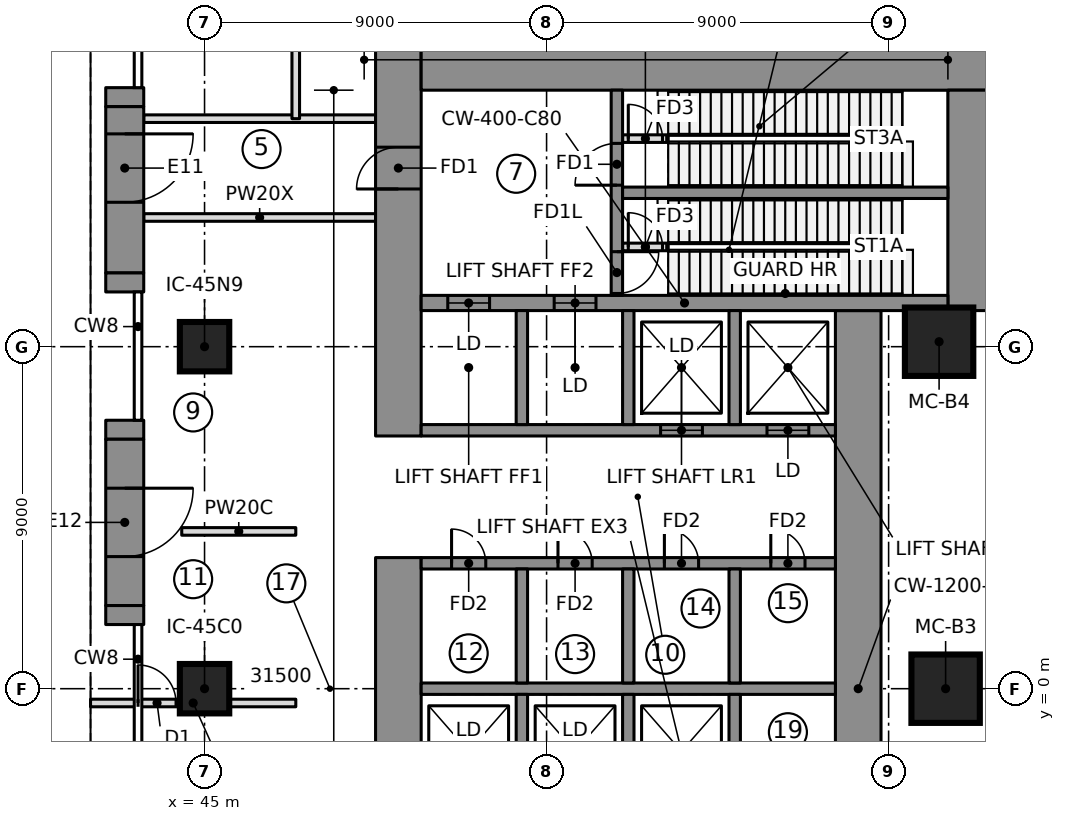
"""IFC4 building model, lengths in metres.
Left out: names, types, materials, properties, quantities, classifications, styles, units other than length and angle.
Written with IfcOpenShell. Run it as: python <this file> out.ifc"""

import sys

from ifc_helpers import new_model, si_unit, direction, frame, frame_2d, origin, origin_2d, place, context, subcontext, project, spatial, polyline, rectangle, outline, extrude, element, fill, save


model = new_model("IFC4")
c1 = context("Model", 3, precision=1e-05, world=origin(), true_north=direction((0.0, 1.0)))
c2 = subcontext(c1, "Body", "Model", "MODEL_VIEW")
j1 = project(units=[si_unit("LENGTHUNIT", "METRE"), si_unit("PLANEANGLEUNIT", "RADIAN")], contexts=[c1])
p1 = place(None, origin())
s1 = spatial("IfcSite", under=j1, at=p1, CompositionType="ELEMENT")
p2 = place(p1, origin())
s2 = spatial("IfcBuilding", under=s1, at=p2, CompositionType="ELEMENT")
p3 = place(p2, origin())
s3 = spatial("IfcBuildingStorey", under=s2, at=p3, CompositionType="ELEMENT", Elevation=0.0)
p4 = place(p3, frame((50.1, 6.65, 0.0), z_axis=(0.0, 0.0, 1.0), x_axis=(0.0, 1.0, 0.0)))
e1 = element("IfcWall", 1, at=p4, inside=s3, PredefinedType="SHEAR", context=c2, shape_type="SweptSolid", body=[
    extrude(rectangle(XDim=10.3, YDim=1.2, at=frame_2d((5.15, 0.0))), origin(), (0.0, 0.0, 1.0), 8.0),
])
p5 = place(p4, frame((6.5, 0.0, 0.0)))
e2 = element("IfcOpeningElement", 2, at=p5, cuts=e1, PredefinedType="OPENING", context=c2, shape_type="SweptSolid", body=[
    extrude(rectangle(XDim=1.1, YDim=2.1, at=frame_2d((0.55, 1.05))), frame((0.0, 0.61, 0.0), z_axis=(0.0, -1.0, 0.0), x_axis=(1.0, 0.0, 0.0)), (0.0, 0.0, 1.0), 1.22),
])
p6 = place(p3, frame((50.1, -3.45, 0.0), z_axis=(0.0, 0.0, 1.0), x_axis=(0.0, 1.0, 0.0)))
e3 = element("IfcWall", 3, at=p6, inside=s3, PredefinedType="SHEAR", context=c2, shape_type="SweptSolid", body=[
    extrude(rectangle(XDim=6.9, YDim=1.2, at=frame_2d((3.45, 0.0))), origin(), (0.0, 0.0, 1.0), 8.0),
])
p7 = place(p3, frame((50.7, 16.35, 0.0), z_axis=(0.0, 0.0, 1.0), x_axis=(1.0, 0.0, 0.0)))
e4 = element("IfcWall", 4, at=p7, inside=s3, PredefinedType="SHEAR", context=c2, shape_type="SweptSolid", body=[
    extrude(rectangle(XDim=15.06, YDim=1.2, at=frame_2d((7.53, 0.0))), origin(), (0.0, 0.0, 1.0), 8.0),
])
p8 = place(p3, frame((65.16, 9.95, 0.0), z_axis=(0.0, 0.0, 1.0), x_axis=(0.0, 1.0, 0.0)))
e5 = element("IfcWall", 5, at=p8, inside=s3, PredefinedType="SHEAR", context=c2, shape_type="SweptSolid", body=[
    extrude(rectangle(XDim=5.8, YDim=1.2, at=frame_2d((2.9, 0.0))), origin(), (0.0, 0.0, 1.0), 8.0),
])
p9 = place(p3, frame((62.2, -9.95, 0.0), z_axis=(0.0, 0.0, 1.0), x_axis=(0.0, 1.0, 0.0)))
e6 = element("IfcWall", 6, at=p9, inside=s3, PredefinedType="SHEAR", context=c2, shape_type="SweptSolid", body=[
    extrude(rectangle(XDim=19.9, YDim=1.2, at=frame_2d((9.95, 0.0))), origin(), (0.0, 0.0, 1.0), 8.0),
])
p10 = place(p3, frame((50.7, 10.15, 0.0), z_axis=(0.0, 0.0, 1.0), x_axis=(1.0, 0.0, 0.0)))
e7 = element("IfcWall", 7, at=p10, inside=s3, PredefinedType="SHEAR", context=c2, shape_type="SweptSolid", body=[
    extrude(rectangle(XDim=13.86, YDim=0.4, at=frame_2d((6.93, 0.0))), origin(), (0.0, 0.0, 1.0), 8.0),
])
p11 = place(p10, frame((0.7, 0.0, 0.0)))
e8 = element("IfcOpeningElement", 8, at=p11, cuts=e7, PredefinedType="OPENING", context=c2, shape_type="SweptSolid", body=[
    extrude(rectangle(XDim=1.1, YDim=2.1, at=frame_2d((0.55, 1.05))), frame((0.0, 0.21, 0.0), z_axis=(0.0, -1.0, 0.0), x_axis=(1.0, 0.0, 0.0)), (0.0, 0.0, 1.0), 0.42),
])
p12 = place(p10, frame((3.5, 0.0, 0.0)))
e9 = element("IfcOpeningElement", 9, at=p12, cuts=e7, PredefinedType="OPENING", context=c2, shape_type="SweptSolid", body=[
    extrude(rectangle(XDim=1.1, YDim=2.1, at=frame_2d((0.55, 1.05))), frame((0.0, 0.21, 0.0), z_axis=(0.0, -1.0, 0.0), x_axis=(1.0, 0.0, 0.0)), (0.0, 0.0, 1.0), 0.42),
])
p13 = place(p3, frame((50.7, 0.0, 0.0), z_axis=(0.0, 0.0, 1.0), x_axis=(1.0, 0.0, 0.0)))
e10 = element("IfcWall", 10, at=p13, inside=s3, PredefinedType="SHEAR", context=c2, shape_type="SweptSolid", body=[
    extrude(rectangle(XDim=10.9, YDim=0.3, at=frame_2d((5.45, 0.0))), origin(), (0.0, 0.0, 1.0), 8.0),
])
p14 = place(p3, frame((50.7, 3.3, 0.0), z_axis=(0.0, 0.0, 1.0), x_axis=(1.0, 0.0, 0.0)))
e11 = element("IfcWall", 11, at=p14, inside=s3, PredefinedType="SHEAR", context=c2, shape_type="SweptSolid", body=[
    extrude(rectangle(XDim=10.9, YDim=0.3, at=frame_2d((5.45, 0.0))), origin(), (0.0, 0.0, 1.0), 8.0),
])
p15 = place(p14, frame((0.8, 0.0, 0.0)))
e12 = element("IfcOpeningElement", 12, at=p15, cuts=e11, PredefinedType="OPENING", context=c2, shape_type="SweptSolid", body=[
    extrude(rectangle(XDim=0.9, YDim=2.1, at=frame_2d((0.45, 1.05))), frame((0.0, 0.16, 0.0), z_axis=(0.0, -1.0, 0.0), x_axis=(1.0, 0.0, 0.0)), (0.0, 0.0, 1.0), 0.32),
])
p16 = place(p14, frame((3.6, 0.0, 0.0)))
e13 = element("IfcOpeningElement", 13, at=p16, cuts=e11, PredefinedType="OPENING", context=c2, shape_type="SweptSolid", body=[
    extrude(rectangle(XDim=0.9, YDim=2.1, at=frame_2d((0.45, 1.05))), frame((0.0, 0.16, 0.0), z_axis=(0.0, -1.0, 0.0), x_axis=(1.0, 0.0, 0.0)), (0.0, 0.0, 1.0), 0.32),
])
p17 = place(p14, frame((6.4, 0.0, 0.0)))
e14 = element("IfcOpeningElement", 14, at=p17, cuts=e11, PredefinedType="OPENING", context=c2, shape_type="SweptSolid", body=[
    extrude(rectangle(XDim=0.9, YDim=2.1, at=frame_2d((0.45, 1.05))), frame((0.0, 0.16, 0.0), z_axis=(0.0, -1.0, 0.0), x_axis=(1.0, 0.0, 0.0)), (0.0, 0.0, 1.0), 0.32),
])
p18 = place(p14, frame((9.2, 0.0, 0.0)))
e15 = element("IfcOpeningElement", 15, at=p18, cuts=e11, PredefinedType="OPENING", context=c2, shape_type="SweptSolid", body=[
    extrude(rectangle(XDim=0.9, YDim=2.1, at=frame_2d((0.45, 1.05))), frame((0.0, 0.16, 0.0), z_axis=(0.0, -1.0, 0.0), x_axis=(1.0, 0.0, 0.0)), (0.0, 0.0, 1.0), 0.32),
])
p19 = place(p3, frame((50.7, 6.8, 0.0), z_axis=(0.0, 0.0, 1.0), x_axis=(1.0, 0.0, 0.0)))
e16 = element("IfcWall", 16, at=p19, inside=s3, PredefinedType="SHEAR", context=c2, shape_type="SweptSolid", body=[
    extrude(rectangle(XDim=10.9, YDim=0.3, at=frame_2d((5.45, 0.0))), origin(), (0.0, 0.0, 1.0), 8.0),
])
p20 = place(p19, frame((6.3, 0.0, 0.0)))
e17 = element("IfcOpeningElement", 17, at=p20, cuts=e16, PredefinedType="OPENING", context=c2, shape_type="SweptSolid", body=[
    extrude(rectangle(XDim=1.1, YDim=2.1, at=frame_2d((0.55, 1.05))), frame((0.0, 0.16, 0.0), z_axis=(0.0, -1.0, 0.0), x_axis=(1.0, 0.0, 0.0)), (0.0, 0.0, 1.0), 0.32),
])
p21 = place(p19, frame((9.1, 0.0, 0.0)))
e18 = element("IfcOpeningElement", 18, at=p21, cuts=e16, PredefinedType="OPENING", context=c2, shape_type="SweptSolid", body=[
    extrude(rectangle(XDim=1.1, YDim=2.1, at=frame_2d((0.55, 1.05))), frame((0.0, 0.16, 0.0), z_axis=(0.0, -1.0, 0.0), x_axis=(1.0, 0.0, 0.0)), (0.0, 0.0, 1.0), 0.32),
])
for number, where, z_axis, x_axis in (
    (19, (53.35, 0.15, 0.0), (0.0, 0.0, 1.0), (0.0, 1.0, 0.0)),
    (20, (53.35, 6.95, 0.0), (0.0, 0.0, 1.0), (0.0, 1.0, 0.0)),
    (21, (56.15, 0.15, 0.0), (0.0, 0.0, 1.0), (0.0, 1.0, 0.0)),
    (22, (56.15, 6.95, 0.0), (0.0, 0.0, 1.0), (0.0, 1.0, 0.0)),
    (23, (58.95, 0.15, 0.0), (0.0, 0.0, 1.0), (0.0, 1.0, 0.0)),
    (24, (58.95, 6.95, 0.0), (0.0, 0.0, 1.0), (0.0, 1.0, 0.0)),
    (25, (53.35, -3.15, 0.0), (0.0, 0.0, 1.0), (0.0, 1.0, 0.0)),
    (26, (56.15, -3.15, 0.0), (0.0, 0.0, 1.0), (0.0, 1.0, 0.0)),
    (27, (58.95, -3.15, 0.0), (0.0, 0.0, 1.0), (0.0, 1.0, 0.0)),
):
    element("IfcWall", number, at=place(p3, frame(where, z_axis=z_axis, x_axis=x_axis)), inside=s3, PredefinedType="SHEAR", context=c2, shape_type="SweptSolid", body=[
        extrude(rectangle(XDim=3.0, YDim=0.3, at=frame_2d((1.5, 0.0))), origin(), (0.0, 0.0, 1.0), 8.0),
    ])
p22 = place(p3, frame((55.85, 10.35, 0.0), z_axis=(0.0, 0.0, 1.0), x_axis=(0.0, 1.0, 0.0)))
e28 = element("IfcWall", 28, at=p22, inside=s3, PredefinedType="SHEAR", context=c2, shape_type="SweptSolid", body=[
    extrude(rectangle(XDim=5.4, YDim=0.3, at=frame_2d((2.7, 0.0))), origin(), (0.0, 0.0, 1.0), 8.0),
])
p23 = place(p22, frame((0.05, 0.0, 0.0)))
e29 = element("IfcOpeningElement", 29, at=p23, cuts=e28, PredefinedType="OPENING", context=c2, shape_type="SweptSolid", body=[
    extrude(rectangle(XDim=1.1, YDim=2.1, at=frame_2d((0.55, 1.05))), frame((0.0, 0.16, 0.0), z_axis=(0.0, -1.0, 0.0), x_axis=(1.0, 0.0, 0.0)), (0.0, 0.0, 1.0), 0.32),
])
p24 = place(p22, frame((2.9, 0.0, 0.0)))
e30 = element("IfcOpeningElement", 30, at=p24, cuts=e28, PredefinedType="OPENING", context=c2, shape_type="SweptSolid", body=[
    extrude(rectangle(XDim=1.1, YDim=2.1, at=frame_2d((0.55, 1.05))), frame((0.0, 0.16, 0.0), z_axis=(0.0, -1.0, 0.0), x_axis=(1.0, 0.0, 0.0)), (0.0, 0.0, 1.0), 0.32),
])
p25 = place(p3, frame((56.0, 13.05, 0.0), z_axis=(0.0, 0.0, 1.0), x_axis=(1.0, 0.0, 0.0)))
e31 = element("IfcWall", 31, at=p25, inside=s3, PredefinedType="SHEAR", context=c2, shape_type="SweptSolid", body=[
    extrude(rectangle(XDim=8.56, YDim=0.3, at=frame_2d((4.28, 0.0))), origin(), (0.0, 0.0, 1.0), 8.0),
])
for number, where, z_axis, x_axis in (
    (32, (64.5, 0.0, 0.0), (0.0, 0.0, 1.0), (1.0, 0.0, 0.0)),
    (33, (64.328, 9.131, 0.0), (0.0, 0.0, 1.0), (1.0, 0.0, 0.0)),
):
    element("IfcColumn", number, at=place(p3, frame(where, z_axis=z_axis, x_axis=x_axis)), inside=s3, PredefinedType="COLUMN", context=c2, shape_type="SweptSolid", body=[
        extrude(rectangle(XDim=1.8, YDim=1.8, at=origin_2d()), origin(), (0.0, 0.0, 1.0), 8.0),
    ])
for number, where, z_axis, x_axis in (
    (34, (45.0, 0.0, 0.0), (0.0, 0.0, 1.0), (1.0, 0.0, 0.0)),
    (35, (45.0, 9.0, 0.0), (0.0, 0.0, 1.0), (1.0, 0.0, 0.0)),
):
    element("IfcColumn", number, at=place(p3, frame(where, z_axis=z_axis, x_axis=x_axis)), inside=s3, PredefinedType="COLUMN", context=c2, shape_type="SweptSolid", body=[
        extrude(rectangle(XDim=1.3, YDim=1.3, at=origin_2d()), origin(), (0.0, 0.0, 1.0), 8.0),
    ])
p26 = place(p3, frame((42.9, 15.816, 0.0), z_axis=(0.0, 0.0, 1.0), x_axis=(0.0, -1.0, 0.0)))
e36 = element("IfcWall", 36, at=p26, inside=s3, PredefinedType="NOTDEFINED", context=c2, shape_type="SweptSolid", body=[
    extrude(outline(polyline([(0.0, -0.5), (0.5, -0.5), (0.5, 0.5), (0.0, 0.5), (0.0, -0.5)])), origin(), (0.0, 0.0, 1.0), 7.7),
])
p27 = place(p3, frame((42.9, 15.316, 0.0), z_axis=(0.0, 0.0, 1.0), x_axis=(0.0, -1.0, 0.0)))
e37 = element("IfcWall", 37, at=p27, inside=s3, PredefinedType="NOTDEFINED", context=c2, shape_type="SweptSolid", body=[
    extrude(outline(polyline([(0.0, -0.5), (4.376, -0.5), (4.376, 0.5), (0.0, 0.5), (0.0, -0.5)])), origin(), (0.0, 0.0, 1.0), 7.7),
])
p28 = place(p27, frame((0.717, 0.0, 0.0)))
e38 = element("IfcOpeningElement", 38, at=p28, cuts=e37, PredefinedType="OPENING", context=c2, shape_type="SweptSolid", body=[
    extrude(rectangle(XDim=1.8, YDim=2.4, at=frame_2d((0.9, 1.2))), frame((0.0, 0.51, 0.0), z_axis=(0.0, -1.0, 0.0), x_axis=(1.0, 0.0, 0.0)), (0.0, 0.0, 1.0), 1.02),
])
for number, where, z_axis, x_axis in (
    (39, (42.9, 10.94, 0.0), (0.0, 0.0, 1.0), (0.0, -1.0, 0.0)),
    (40, (42.9, 7.064, 0.0), (0.0, 0.0, 1.0), (0.0, -1.0, 0.0)),
):
    element("IfcWall", number, at=place(p3, frame(where, z_axis=z_axis, x_axis=x_axis)), inside=s3, PredefinedType="NOTDEFINED", context=c2, shape_type="SweptSolid", body=[
        extrude(outline(polyline([(0.0, -0.5), (0.5, -0.5), (0.5, 0.5), (0.0, 0.5), (0.0, -0.5)])), origin(), (0.0, 0.0, 1.0), 7.7),
    ])
p29 = place(p3, frame((42.9, 6.564, 0.0), z_axis=(0.0, 0.0, 1.0), x_axis=(0.0, -1.0, 0.0)))
e41 = element("IfcWall", 41, at=p29, inside=s3, PredefinedType="NOTDEFINED", context=c2, shape_type="SweptSolid", body=[
    extrude(outline(polyline([(0.0, -0.5), (4.376, -0.5), (4.376, 0.5), (0.0, 0.5), (0.0, -0.5)])), origin(), (0.0, 0.0, 1.0), 7.7),
])
p30 = place(p29, frame((1.288, 0.0, 0.0)))
e42 = element("IfcOpeningElement", 42, at=p30, cuts=e41, PredefinedType="OPENING", context=c2, shape_type="SweptSolid", body=[
    extrude(rectangle(XDim=1.8, YDim=2.4, at=frame_2d((0.9, 1.2))), frame((0.0, 0.51, 0.0), z_axis=(0.0, -1.0, 0.0), x_axis=(1.0, 0.0, 0.0)), (0.0, 0.0, 1.0), 1.02),
])
p31 = place(p3, frame((42.9, 2.188, 0.0), z_axis=(0.0, 0.0, 1.0), x_axis=(0.0, -1.0, 0.0)))
e43 = element("IfcWall", 43, at=p31, inside=s3, PredefinedType="NOTDEFINED", context=c2, shape_type="SweptSolid", body=[
    extrude(outline(polyline([(0.0, -0.5), (0.5, -0.5), (0.5, 0.5), (0.0, 0.5), (0.0, -0.5)])), origin(), (0.0, 0.0, 1.0), 7.7),
])
p32 = place(p3, frame((42.0, -0.376, 0.0), z_axis=(0.0, 0.0, 1.0), x_axis=(1.0, 0.0, 0.0)))
e44 = element("IfcWall", 44, at=p32, inside=s3, PredefinedType="PARTITIONING", context=c2, shape_type="SweptSolid", body=[
    extrude(rectangle(XDim=5.401, YDim=0.2, at=frame_2d((2.7, 0.0))), origin(), (0.0, 0.0, 1.0), 7.65),
])
p33 = place(p32, frame((1.25, 0.0, 0.0)))
e45 = element("IfcOpeningElement", 45, at=p33, cuts=e44, PredefinedType="OPENING", context=c2, shape_type="SweptSolid", body=[
    extrude(rectangle(XDim=1.0, YDim=2.1, at=frame_2d((0.5, 1.05))), frame((0.0, 0.11, 0.0), z_axis=(0.0, -1.0, 0.0), x_axis=(1.0, 0.0, 0.0)), (0.0, 0.0, 1.0), 0.22),
])
p34 = place(p3, frame((44.4, 4.139, 0.0), z_axis=(0.0, 0.0, 1.0), x_axis=(1.0, 0.0, 0.0)))
e46 = element("IfcWall", 46, at=p34, inside=s3, PredefinedType="PARTITIONING", context=c2, shape_type="SweptSolid", body=[
    extrude(rectangle(XDim=3.001, YDim=0.2, at=frame_2d((1.5, 0.0))), origin(), (0.0, 0.0, 1.0), 7.65),
])
for number, where, z_axis, x_axis in (
    (47, (43.4, 12.4, 0.0), (0.0, 0.0, 1.0), (1.0, 0.0, 0.0)),
    (48, (43.4, 15.0, 0.0), (0.0, 0.0, 1.0), (1.0, 0.0, 0.0)),
):
    element("IfcWall", number, at=place(p3, frame(where, z_axis=z_axis, x_axis=x_axis)), inside=s3, PredefinedType="PARTITIONING", context=c2, shape_type="SweptSolid", body=[
        extrude(rectangle(XDim=6.1, YDim=0.2, at=frame_2d((3.05, 0.0))), origin(), (0.0, 0.0, 1.0), 7.65),
    ])
p35 = place(p3, frame((47.4, 20.4, 0.0), z_axis=(0.0, 0.0, 1.0), x_axis=(0.0, -1.0, 0.0)))
e49 = element("IfcWall", 49, at=p35, inside=s3, PredefinedType="PARTITIONING", context=c2, shape_type="SweptSolid", body=[
    extrude(rectangle(XDim=5.4, YDim=0.2, at=frame_2d((2.7, 0.0))), origin(), (0.0, 0.0, 1.0), 7.65),
])
p36 = place(p35, frame((2.2, 0.0, 0.0)))
e50 = element("IfcOpeningElement", 50, at=p36, cuts=e49, PredefinedType="OPENING", context=c2, shape_type="SweptSolid", body=[
    extrude(rectangle(XDim=1.2, YDim=2.1, at=frame_2d((0.6, 1.05))), frame((0.0, 0.11, 0.0), z_axis=(0.0, -1.0, 0.0), x_axis=(1.0, 0.0, 0.0)), (0.0, 0.0, 1.0), 0.22),
])
p37 = place(p3, frame((56.0, 11.625, 0.0), z_axis=(0.0, 0.0, 1.0), x_axis=(1.0, 0.0, 0.0)))
e51 = element("IfcWall", 51, at=p37, inside=s3, PredefinedType="PARTITIONING", context=c2, shape_type="SweptSolid", body=[
    extrude(rectangle(XDim=1.2, YDim=0.2, at=frame_2d((0.6, 0.0))), origin(), (0.0, 0.0, 1.0), 7.65),
])
p38 = place(p37, frame((0.15, 0.0, 0.0)))
e52 = element("IfcOpeningElement", 52, at=p38, cuts=e51, PredefinedType="OPENING", context=c2, shape_type="SweptSolid", body=[
    extrude(rectangle(XDim=0.9, YDim=2.1, at=frame_2d((0.45, 1.05))), frame((0.0, 0.11, 0.0), z_axis=(0.0, -1.0, 0.0), x_axis=(1.0, 0.0, 0.0)), (0.0, 0.0, 1.0), 0.22),
])
p39 = place(p3, frame((56.0, 14.475, 0.0), z_axis=(0.0, 0.0, 1.0), x_axis=(1.0, 0.0, 0.0)))
e53 = element("IfcWall", 53, at=p39, inside=s3, PredefinedType="PARTITIONING", context=c2, shape_type="SweptSolid", body=[
    extrude(rectangle(XDim=1.2, YDim=0.2, at=frame_2d((0.6, 0.0))), origin(), (0.0, 0.0, 1.0), 7.65),
])
p40 = place(p39, frame((0.15, 0.0, 0.0)))
e54 = element("IfcOpeningElement", 54, at=p40, cuts=e53, PredefinedType="OPENING", context=c2, shape_type="SweptSolid", body=[
    extrude(rectangle(XDim=0.9, YDim=2.1, at=frame_2d((0.45, 1.05))), frame((0.0, 0.11, 0.0), z_axis=(0.0, -1.0, 0.0), x_axis=(1.0, 0.0, 0.0)), (0.0, 0.0, 1.0), 0.22),
])
p41 = place(p28, origin())
e55 = element("IfcDoor", 55, at=p41, inside=s3, OperationType="DOUBLE_DOOR_SINGLE_SWING", PredefinedType="DOOR", context=c2, shape_type="SweptSolid", body=[
    extrude(rectangle(XDim=1.8, YDim=2.4, at=frame_2d((0.9, 1.2))), frame((0.0, 0.495, 0.0), z_axis=(0.0, -1.0, 0.0), x_axis=(1.0, 0.0, 0.0)), (0.0, 0.0, 1.0), 0.05),
])
fill(e38, e55)
p42 = place(p30, origin())
e56 = element("IfcDoor", 56, at=p42, inside=s3, OperationType="DOUBLE_DOOR_SINGLE_SWING", PredefinedType="DOOR", context=c2, shape_type="SweptSolid", body=[
    extrude(rectangle(XDim=1.8, YDim=2.4, at=frame_2d((0.9, 1.2))), frame((0.0, 0.495, 0.0), z_axis=(0.0, -1.0, 0.0), x_axis=(1.0, 0.0, 0.0)), (0.0, 0.0, 1.0), 0.05),
])
fill(e42, e56)
p43 = place(p33, origin())
e57 = element("IfcDoor", 57, at=p43, inside=s3, OperationType="SINGLE_SWING_LEFT", PredefinedType="DOOR", context=c2, shape_type="SweptSolid", body=[
    extrude(rectangle(XDim=1.0, YDim=2.1, at=frame_2d((0.5, 1.05))), frame((0.0, 0.025, 0.0), z_axis=(0.0, -1.0, 0.0), x_axis=(1.0, 0.0, 0.0)), (0.0, 0.0, 1.0), 0.05),
])
fill(e45, e57)
p44 = place(p38, origin())
e58 = element("IfcDoor", 58, at=p44, inside=s3, OperationType="SINGLE_SWING_LEFT", PredefinedType="DOOR", context=c2, shape_type="SweptSolid", body=[
    extrude(rectangle(XDim=0.9, YDim=2.1, at=frame_2d((0.45, 1.05))), frame((0.0, 0.025, 0.0), z_axis=(0.0, -1.0, 0.0), x_axis=(1.0, 0.0, 0.0)), (0.0, 0.0, 1.0), 0.05),
])
fill(e52, e58)
p45 = place(p40, origin())
e59 = element("IfcDoor", 59, at=p45, inside=s3, OperationType="SINGLE_SWING_LEFT", PredefinedType="DOOR", context=c2, shape_type="SweptSolid", body=[
    extrude(rectangle(XDim=0.9, YDim=2.1, at=frame_2d((0.45, 1.05))), frame((0.0, 0.025, 0.0), z_axis=(0.0, -1.0, 0.0), x_axis=(1.0, 0.0, 0.0)), (0.0, 0.0, 1.0), 0.05),
])
fill(e54, e59)
p46 = place(p11, origin())
e60 = element("IfcDoor", 60, at=p46, inside=s3, OperationType="DOUBLE_DOOR_SLIDING", PredefinedType="DOOR", context=c2, shape_type="SweptSolid", body=[
    extrude(rectangle(XDim=1.1, YDim=2.1, at=frame_2d((0.55, 1.05))), frame((0.0, 0.025, 0.0), z_axis=(0.0, -1.0, 0.0), x_axis=(1.0, 0.0, 0.0)), (0.0, 0.0, 1.0), 0.05),
])
fill(e8, e60)
p47 = place(p12, origin())
e61 = element("IfcDoor", 61, at=p47, inside=s3, OperationType="DOUBLE_DOOR_SLIDING", PredefinedType="DOOR", context=c2, shape_type="SweptSolid", body=[
    extrude(rectangle(XDim=1.1, YDim=2.1, at=frame_2d((0.55, 1.05))), frame((0.0, 0.025, 0.0), z_axis=(0.0, -1.0, 0.0), x_axis=(1.0, 0.0, 0.0)), (0.0, 0.0, 1.0), 0.05),
])
fill(e9, e61)
p48 = place(p20, origin())
e62 = element("IfcDoor", 62, at=p48, inside=s3, OperationType="DOUBLE_DOOR_SLIDING", PredefinedType="DOOR", context=c2, shape_type="SweptSolid", body=[
    extrude(rectangle(XDim=1.1, YDim=2.1, at=frame_2d((0.55, 1.05))), frame((0.0, 0.025, 0.0), z_axis=(0.0, -1.0, 0.0), x_axis=(1.0, 0.0, 0.0)), (0.0, 0.0, 1.0), 0.05),
])
fill(e17, e62)
p49 = place(p21, origin())
e63 = element("IfcDoor", 63, at=p49, inside=s3, OperationType="DOUBLE_DOOR_SLIDING", PredefinedType="DOOR", context=c2, shape_type="SweptSolid", body=[
    extrude(rectangle(XDim=1.1, YDim=2.1, at=frame_2d((0.55, 1.05))), frame((0.0, 0.025, 0.0), z_axis=(0.0, -1.0, 0.0), x_axis=(1.0, 0.0, 0.0)), (0.0, 0.0, 1.0), 0.05),
])
fill(e18, e63)
p50 = place(p23, origin())
e64 = element("IfcDoor", 64, at=p50, inside=s3, OperationType="SINGLE_SWING_LEFT", PredefinedType="DOOR", context=c2, shape_type="SweptSolid", body=[
    extrude(rectangle(XDim=1.1, YDim=2.1, at=frame_2d((0.55, 1.05))), frame((0.0, 0.025, 0.0), z_axis=(0.0, -1.0, 0.0), x_axis=(1.0, 0.0, 0.0)), (0.0, 0.0, 1.0), 0.05),
])
fill(e29, e64)
p51 = place(p24, origin())
e65 = element("IfcDoor", 65, at=p51, inside=s3, OperationType="SINGLE_SWING_RIGHT", PredefinedType="DOOR", context=c2, shape_type="SweptSolid", body=[
    extrude(rectangle(XDim=1.1, YDim=2.1, at=frame_2d((0.55, 1.05))), frame((0.0, 0.025, 0.0), z_axis=(0.0, -1.0, 0.0), x_axis=(1.0, 0.0, 0.0)), (0.0, 0.0, 1.0), 0.05),
])
fill(e30, e65)
p52 = place(p5, origin())
e66 = element("IfcDoor", 66, at=p52, inside=s3, OperationType="SINGLE_SWING_RIGHT", PredefinedType="DOOR", context=c2, shape_type="SweptSolid", body=[
    extrude(rectangle(XDim=1.1, YDim=2.1, at=frame_2d((0.55, 1.05))), frame((0.0, 0.025, 0.0), z_axis=(0.0, -1.0, 0.0), x_axis=(1.0, 0.0, 0.0)), (0.0, 0.0, 1.0), 0.05),
])
fill(e2, e66)
p53 = place(p15, origin())
e67 = element("IfcDoor", 67, at=p53, inside=s3, OperationType="SINGLE_SWING_LEFT", PredefinedType="DOOR", context=c2, shape_type="SweptSolid", body=[
    extrude(rectangle(XDim=0.9, YDim=2.1, at=frame_2d((0.45, 1.05))), frame((0.0, 0.025, 0.0), z_axis=(0.0, -1.0, 0.0), x_axis=(1.0, 0.0, 0.0)), (0.0, 0.0, 1.0), 0.05),
])
fill(e12, e67)
p54 = place(p16, origin())
e68 = element("IfcDoor", 68, at=p54, inside=s3, OperationType="SINGLE_SWING_LEFT", PredefinedType="DOOR", context=c2, shape_type="SweptSolid", body=[
    extrude(rectangle(XDim=0.9, YDim=2.1, at=frame_2d((0.45, 1.05))), frame((0.0, 0.025, 0.0), z_axis=(0.0, -1.0, 0.0), x_axis=(1.0, 0.0, 0.0)), (0.0, 0.0, 1.0), 0.05),
])
fill(e13, e68)
p55 = place(p17, origin())
e69 = element("IfcDoor", 69, at=p55, inside=s3, OperationType="SINGLE_SWING_LEFT", PredefinedType="DOOR", context=c2, shape_type="SweptSolid", body=[
    extrude(rectangle(XDim=0.9, YDim=2.1, at=frame_2d((0.45, 1.05))), frame((0.0, 0.025, 0.0), z_axis=(0.0, -1.0, 0.0), x_axis=(1.0, 0.0, 0.0)), (0.0, 0.0, 1.0), 0.05),
])
fill(e14, e69)
p56 = place(p18, origin())
e70 = element("IfcDoor", 70, at=p56, inside=s3, OperationType="SINGLE_SWING_LEFT", PredefinedType="DOOR", context=c2, shape_type="SweptSolid", body=[
    extrude(rectangle(XDim=0.9, YDim=2.1, at=frame_2d((0.45, 1.05))), frame((0.0, 0.025, 0.0), z_axis=(0.0, -1.0, 0.0), x_axis=(1.0, 0.0, 0.0)), (0.0, 0.0, 1.0), 0.05),
])
fill(e15, e70)
save(model, sys.argv[1])
